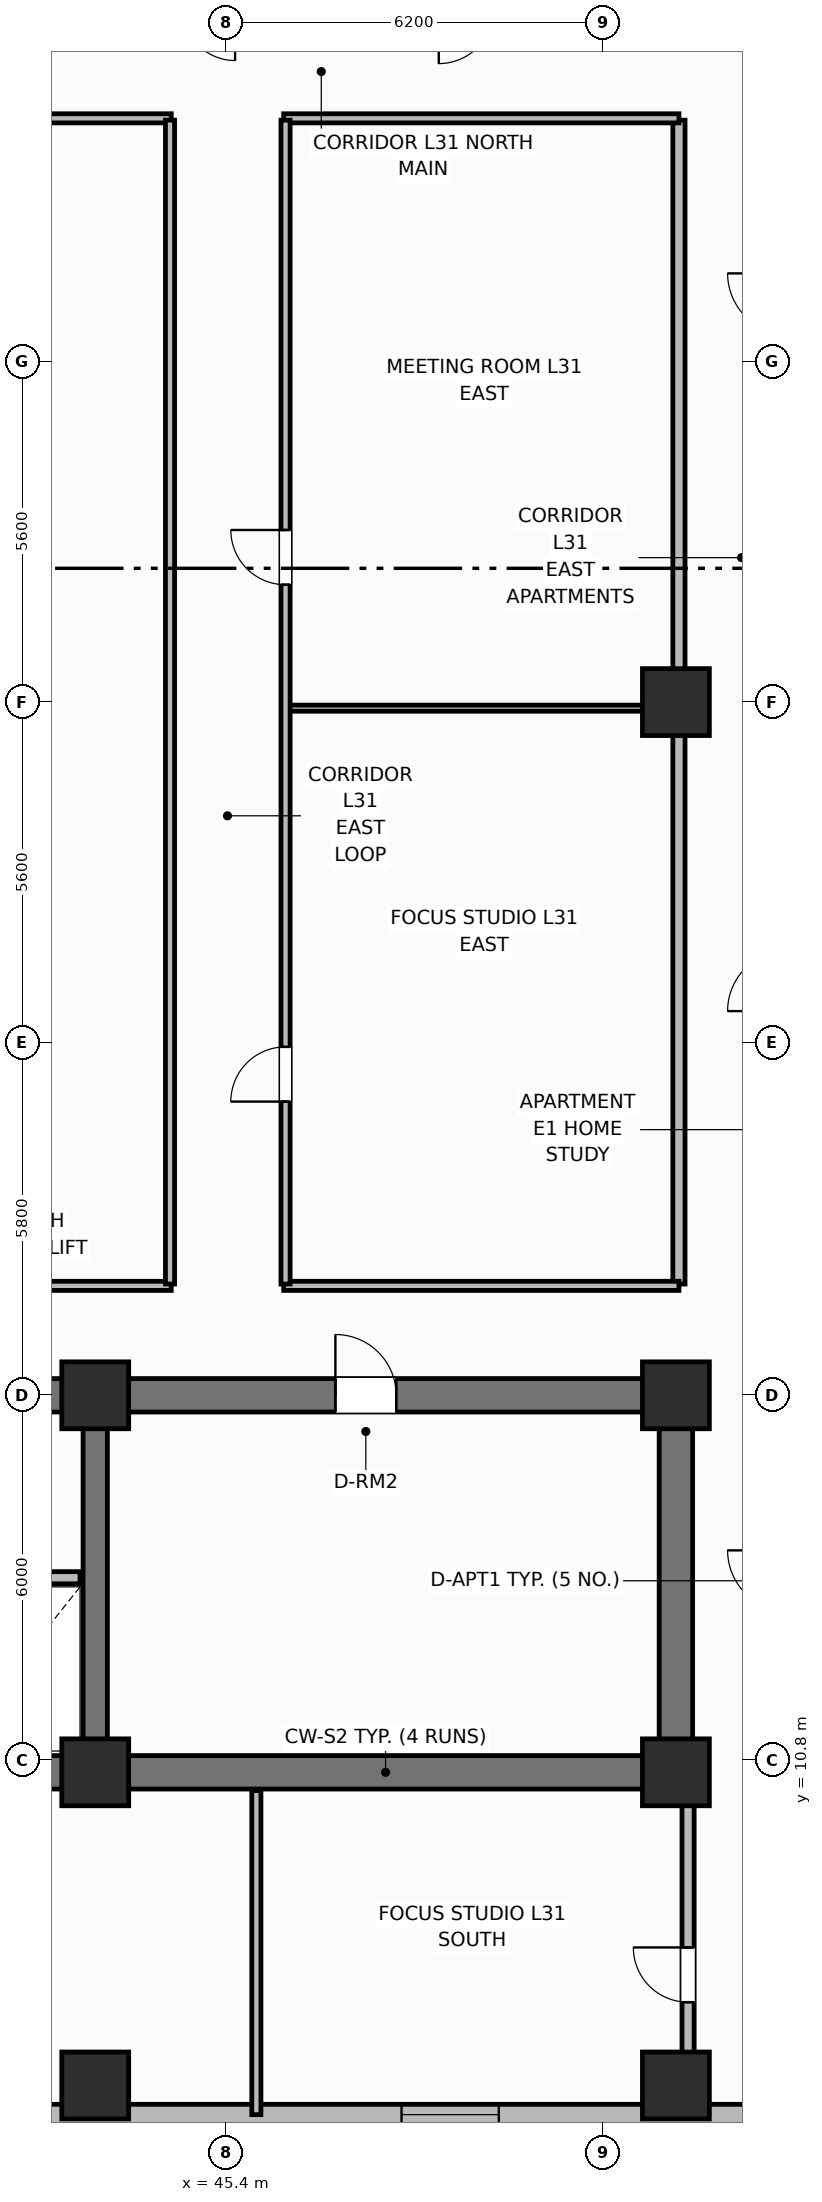
"""IFC4 building model, lengths in metres.
Left out: names, types, materials, properties, quantities, classifications, styles, units other than length and angle.
Written with IfcOpenShell. Run it as: python <this file> out.ifc"""

import sys

from ifc_helpers import new_model, si_unit, direction, frame, frame_2d, origin, origin_2d, place, context, subcontext, project, spatial, rectangle, extrude, element, fill, save


model = new_model("IFC4")
c1 = context("Model", 3, precision=1e-05, world=origin(), true_north=direction((0.0, 1.0)))
c2 = subcontext(c1, "Body", "Model", "MODEL_VIEW")
j1 = project(units=[si_unit("LENGTHUNIT", "METRE"), si_unit("PLANEANGLEUNIT", "RADIAN")], contexts=[c1])
p1 = place(None, origin())
s1 = spatial("IfcSite", under=j1, at=p1, CompositionType="ELEMENT")
p2 = place(p1, origin())
s2 = spatial("IfcBuilding", under=s1, at=p2, CompositionType="ELEMENT")
p3 = place(p2, frame((0.0, 0.0, 125.3)))
s3 = spatial("IfcBuildingStorey", under=s2, at=p3, CompositionType="ELEMENT", Elevation=125.3)
p4 = place(p3, frame((52.8, 10.6, 0.0), z_axis=(0.0, 0.0, 1.0), x_axis=(-1.0, 0.0, 0.0)))
e1 = element("IfcWall", 1, at=p4, inside=s3, PredefinedType="SHEAR", context=c2, shape_type="SweptSolid", body=[
    extrude(rectangle(XDim=27.2, YDim=0.55, at=frame_2d((13.6, 0.0))), origin(), (0.0, 0.0, 1.0), 3.7),
])
p5 = place(p3, frame((52.8, 10.875, 0.0), z_axis=(0.0, 0.0, 1.0), x_axis=(0.0, 1.0, 0.0)))
e2 = element("IfcWall", 2, at=p5, inside=s3, PredefinedType="SHEAR", context=c2, shape_type="SweptSolid", body=[
    extrude(rectangle(XDim=5.65, YDim=0.55, at=frame_2d((2.825, 0.0))), origin(), (0.0, 0.0, 1.0), 3.7),
])
p6 = place(p3, frame((25.6, 16.8, 0.0), z_axis=(0.0, 0.0, 1.0), x_axis=(1.0, 0.0, 0.0)))
e3 = element("IfcWall", 3, at=p6, inside=s3, PredefinedType="SHEAR", context=c2, shape_type="SweptSolid", body=[
    extrude(rectangle(XDim=27.2, YDim=0.55, at=frame_2d((13.6, 0.0))), origin(), (0.0, 0.0, 1.0), 3.7),
])
p7 = place(p6, frame((1.9, 0.0, 0.0)))
e4 = element("IfcOpeningElement", 4, at=p7, cuts=e3, PredefinedType="OPENING", context=c2, shape_type="SweptSolid", body=[
    extrude(rectangle(XDim=1.1, YDim=2.15, at=frame_2d((0.55, 1.075))), frame((0.0, 0.285, 0.0), z_axis=(0.0, -1.0, 0.0), x_axis=(1.0, 0.0, 0.0)), (0.0, 0.0, 1.0), 0.57),
])
p8 = place(p6, frame((13.0, 0.0, 0.0)))
e5 = element("IfcOpeningElement", 5, at=p8, cuts=e3, PredefinedType="OPENING", context=c2, shape_type="SweptSolid", body=[
    extrude(rectangle(XDim=1.2, YDim=2.15, at=frame_2d((0.6, 1.075))), frame((0.0, 0.285, 0.0), z_axis=(0.0, -1.0, 0.0), x_axis=(1.0, 0.0, 0.0)), (0.0, 0.0, 1.0), 0.57),
])
p9 = place(p6, frame((21.6, 0.0, 0.0)))
e6 = element("IfcOpeningElement", 6, at=p9, cuts=e3, PredefinedType="OPENING", context=c2, shape_type="SweptSolid", body=[
    extrude(rectangle(XDim=1.0, YDim=2.15, at=frame_2d((0.5, 1.075))), frame((0.0, 0.285, 0.0), z_axis=(0.0, -1.0, 0.0), x_axis=(1.0, 0.0, 0.0)), (0.0, 0.0, 1.0), 0.57),
])
p10 = place(p3, frame((43.25, 10.875, 0.0), z_axis=(0.0, 0.0, 1.0), x_axis=(0.0, 1.0, 0.0)))
e7 = element("IfcWall", 7, at=p10, inside=s3, PredefinedType="SHEAR", context=c2, shape_type="SweptSolid", body=[
    extrude(rectangle(XDim=5.65, YDim=0.4, at=frame_2d((2.825, 0.0))), origin(), (0.0, 0.0, 1.0), 3.7),
])
for number, where, z_axis, x_axis in (
    (8, (43.25, 10.6, 0.0), (0.0, 0.0, 1.0), (1.0, 0.0, 0.0)),
    (9, (43.25, 16.8, 0.0), (0.0, 0.0, 1.0), (1.0, 0.0, 0.0)),
    (10, (52.8, 10.6, 0.0), (0.0, 0.0, 1.0), (1.0, 0.0, 0.0)),
    (11, (52.8, 16.8, 0.0), (0.0, 0.0, 1.0), (1.0, 0.0, 0.0)),
    (12, (52.8, 28.2, 0.0), (0.0, 0.0, 1.0), (1.0, 0.0, 0.0)),
    (13, (43.25, 5.45, 0.0), (0.0, 0.0, 1.0), (1.0, 0.0, 0.0)),
    (14, (52.8, 5.45, 0.0), (0.0, 0.0, 1.0), (1.0, 0.0, 0.0)),
):
    element("IfcColumn", number, at=place(p3, frame(where, z_axis=z_axis, x_axis=x_axis)), inside=s3, PredefinedType="COLUMN", context=c2, shape_type="SweptSolid", body=[
        extrude(rectangle(XDim=1.1, YDim=1.1, at=origin_2d()), origin(), (0.0, 0.0, 1.0), 3.7),
    ])
p11 = place(p3, frame((42.4, 4.97, 0.0), z_axis=(0.0, 0.0, 1.0), x_axis=(1.0, 0.0, 0.0)))
e15 = element("IfcWall", 15, at=p11, inside=s3, PredefinedType="SOLIDWALL", context=c2, shape_type="SweptSolid", body=[
    extrude(rectangle(XDim=17.4, YDim=0.34, at=frame_2d((8.7, 0.0))), origin(), (0.0, 0.0, 1.0), 2.7),
])
p12 = place(p11, frame((5.887, 0.0, 0.68)))
e16 = element("IfcOpeningElement", 16, at=p12, cuts=e15, PredefinedType="OPENING", context=c2, shape_type="SweptSolid", body=[
    extrude(rectangle(XDim=1.6, YDim=1.9, at=frame_2d((0.8, 0.95))), frame((0.0, 0.18, 0.0), z_axis=(0.0, -1.0, 0.0), x_axis=(1.0, 0.0, 0.0)), (0.0, 0.0, 1.0), 0.36),
])
p13 = place(p11, frame((13.938, 0.0, 0.68)))
e17 = element("IfcOpeningElement", 17, at=p13, cuts=e15, PredefinedType="OPENING", context=c2, shape_type="SweptSolid", body=[
    extrude(rectangle(XDim=1.6, YDim=1.9, at=frame_2d((0.8, 0.95))), frame((0.0, 0.18, 0.0), z_axis=(0.0, -1.0, 0.0), x_axis=(1.0, 0.0, 0.0)), (0.0, 0.0, 1.0), 0.36),
])
p14 = place(p3, frame((35.4, 13.8, 0.0), z_axis=(0.0, 0.0, 1.0), x_axis=(1.0, 0.0, 0.0)))
e18 = element("IfcWall", 18, at=p14, inside=s3, PredefinedType="PARTITIONING", context=c2, shape_type="SweptSolid", body=[
    extrude(rectangle(XDim=7.6, YDim=0.2, at=frame_2d((3.8, 0.0))), origin(), (0.0, 0.0, 1.0), 2.3),
])
p15 = place(p14, frame((0.7, 0.0, 0.0)))
e19 = element("IfcOpeningElement", 19, at=p15, cuts=e18, PredefinedType="OPENING", context=c2, shape_type="SweptSolid", body=[
    extrude(rectangle(XDim=1.1, YDim=2.15, at=frame_2d((0.55, 1.075))), frame((0.0, 0.11, 0.0), z_axis=(0.0, -1.0, 0.0), x_axis=(1.0, 0.0, 0.0)), (0.0, 0.0, 1.0), 0.22),
])
p16 = place(p14, frame((3.35, 0.0, 0.0)))
e20 = element("IfcOpeningElement", 20, at=p16, cuts=e18, PredefinedType="OPENING", context=c2, shape_type="SweptSolid", body=[
    extrude(rectangle(XDim=1.2, YDim=2.15, at=frame_2d((0.6, 1.075))), frame((0.0, 0.11, 0.0), z_axis=(0.0, -1.0, 0.0), x_axis=(1.0, 0.0, 0.0)), (0.0, 0.0, 1.0), 0.22),
])
p17 = place(p3, frame((52.85, 18.63, 0.0), z_axis=(0.0, 0.0, 1.0), x_axis=(0.0, 1.0, 0.0)))
e21 = element("IfcWall", 21, at=p17, inside=s3, PredefinedType="PARTITIONING", context=c2, shape_type="SweptSolid", body=[
    extrude(rectangle(XDim=19.14, YDim=0.2, at=frame_2d((9.57, 0.0))), origin(), (0.0, 0.0, 1.0), 2.53),
])
for number, where, z_axis, x_axis in (
    (22, (33.9, 18.6, 0.0), (0.0, 0.0, 1.0), (1.0, 0.0, 0.0)),
    (23, (33.9, 37.8, 0.0), (0.0, 0.0, 1.0), (1.0, 0.0, 0.0)),
):
    element("IfcWall", number, at=place(p3, frame(where, z_axis=z_axis, x_axis=x_axis)), inside=s3, PredefinedType="PARTITIONING", context=c2, shape_type="SweptSolid", body=[
        extrude(rectangle(XDim=10.6, YDim=0.15, at=frame_2d((5.3, 0.0))), origin(), (0.0, 0.0, 1.0), 2.53),
    ])
for number, where, z_axis, x_axis in (
    (24, (46.35, 18.6, 0.0), (0.0, 0.0, 1.0), (1.0, 0.0, 0.0)),
    (25, (46.35, 37.8, 0.0), (0.0, 0.0, 1.0), (1.0, 0.0, 0.0)),
):
    element("IfcWall", number, at=place(p3, frame(where, z_axis=z_axis, x_axis=x_axis)), inside=s3, PredefinedType="PARTITIONING", context=c2, shape_type="SweptSolid", body=[
        extrude(rectangle(XDim=6.5, YDim=0.15, at=frame_2d((3.25, 0.0))), origin(), (0.0, 0.0, 1.0), 2.53),
    ])
p18 = place(p3, frame((46.38, 28.1, 0.0), z_axis=(0.0, 0.0, 1.0), x_axis=(1.0, 0.0, 0.0)))
e26 = element("IfcWall", 26, at=p18, inside=s3, PredefinedType="PARTITIONING", context=c2, shape_type="SweptSolid", body=[
    extrude(rectangle(XDim=6.42, YDim=0.1, at=frame_2d((3.21, 0.0))), origin(), (0.0, 0.0, 1.0), 2.53),
])
p19 = place(p3, frame((44.48, 18.63, 0.0), z_axis=(0.0, 0.0, 1.0), x_axis=(0.0, 1.0, 0.0)))
e27 = element("IfcWall", 27, at=p19, inside=s3, PredefinedType="PARTITIONING", context=c2, shape_type="SweptSolid", body=[
    extrude(rectangle(XDim=19.14, YDim=0.15, at=frame_2d((9.57, 0.0))), origin(), (0.0, 0.0, 1.0), 2.53),
])
p20 = place(p3, frame((46.38, 18.63, 0.0), z_axis=(0.0, 0.0, 1.0), x_axis=(0.0, 1.0, 0.0)))
e28 = element("IfcWall", 28, at=p20, inside=s3, PredefinedType="PARTITIONING", context=c2, shape_type="SweptSolid", body=[
    extrude(rectangle(XDim=19.14, YDim=0.15, at=frame_2d((9.57, 0.0))), origin(), (0.0, 0.0, 1.0), 2.53),
])
p21 = place(p20, frame((3.0, 0.0, 0.0)))
e29 = element("IfcOpeningElement", 29, at=p21, cuts=e28, PredefinedType="OPENING", context=c2, shape_type="SweptSolid", body=[
    extrude(rectangle(XDim=0.9, YDim=2.1, at=frame_2d((0.45, 1.05))), frame((0.0, 0.085, 0.0), z_axis=(0.0, -1.0, 0.0), x_axis=(1.0, 0.0, 0.0)), (0.0, 0.0, 1.0), 0.17),
])
p22 = place(p20, frame((11.5, 0.0, 0.0)))
e30 = element("IfcOpeningElement", 30, at=p22, cuts=e28, PredefinedType="OPENING", context=c2, shape_type="SweptSolid", body=[
    extrude(rectangle(XDim=0.9, YDim=2.1, at=frame_2d((0.45, 1.05))), frame((0.0, 0.085, 0.0), z_axis=(0.0, -1.0, 0.0), x_axis=(1.0, 0.0, 0.0)), (0.0, 0.0, 1.0), 0.17),
])
p23 = place(p3, frame((45.9, 4.97, 0.0), z_axis=(0.0, 0.0, 1.0), x_axis=(0.0, 1.0, 0.0)))
e31 = element("IfcWall", 31, at=p23, inside=s3, PredefinedType="PARTITIONING", context=c2, shape_type="SweptSolid", body=[
    extrude(rectangle(XDim=5.33, YDim=0.15, at=frame_2d((2.665, 0.0))), origin(), (0.0, 0.0, 1.0), 2.53),
])
p24 = place(p3, frame((53.0, 5.77, 0.0), z_axis=(0.0, 0.0, 1.0), x_axis=(0.0, 1.0, 0.0)))
e32 = element("IfcWall", 32, at=p24, inside=s3, PredefinedType="PARTITIONING", context=c2, shape_type="SweptSolid", body=[
    extrude(rectangle(XDim=4.53, YDim=0.2, at=frame_2d((2.265, 0.0))), origin(), (0.0, 0.0, 1.0), 2.53),
])
p25 = place(p24, frame((1.05, 0.0, 0.0)))
e33 = element("IfcOpeningElement", 33, at=p25, cuts=e32, PredefinedType="OPENING", context=c2, shape_type="SweptSolid", body=[
    extrude(rectangle(XDim=0.9, YDim=2.1, at=frame_2d((0.45, 1.05))), frame((0.0, 0.11, 0.0), z_axis=(0.0, -1.0, 0.0), x_axis=(1.0, 0.0, 0.0)), (0.0, 0.0, 1.0), 0.22),
])
p26 = place(p12, origin())
e34 = element("IfcWindow", 34, at=p26, inside=s3, PartitioningType="SINGLE_PANEL", PredefinedType="WINDOW", context=c2, shape_type="SweptSolid", body=[
    extrude(rectangle(XDim=1.6, YDim=1.9, at=frame_2d((0.8, 0.95))), frame((0.0, 0.03, 0.0), z_axis=(0.0, -1.0, 0.0), x_axis=(1.0, 0.0, 0.0)), (0.0, 0.0, 1.0), 0.06),
])
fill(e16, e34)
p27 = place(p21, origin())
e35 = element("IfcDoor", 35, at=p27, inside=s3, OperationType="SINGLE_SWING_LEFT", PredefinedType="DOOR", context=c2, shape_type="SweptSolid", body=[
    extrude(rectangle(XDim=0.9, YDim=2.1, at=frame_2d((0.45, 1.05))), frame((0.0, 0.025, 0.0), z_axis=(0.0, -1.0, 0.0), x_axis=(1.0, 0.0, 0.0)), (0.0, 0.0, 1.0), 0.05),
])
fill(e29, e35)
p28 = place(p22, origin())
e36 = element("IfcDoor", 36, at=p28, inside=s3, OperationType="SINGLE_SWING_RIGHT", PredefinedType="DOOR", context=c2, shape_type="SweptSolid", body=[
    extrude(rectangle(XDim=0.9, YDim=2.1, at=frame_2d((0.45, 1.05))), frame((0.0, 0.025, 0.0), z_axis=(0.0, -1.0, 0.0), x_axis=(1.0, 0.0, 0.0)), (0.0, 0.0, 1.0), 0.05),
])
fill(e30, e36)
p29 = place(p25, origin())
e37 = element("IfcDoor", 37, at=p29, inside=s3, OperationType="SINGLE_SWING_RIGHT", PredefinedType="DOOR", context=c2, shape_type="SweptSolid", body=[
    extrude(rectangle(XDim=0.9, YDim=2.1, at=frame_2d((0.45, 1.05))), frame((0.0, 0.025, 0.0), z_axis=(0.0, -1.0, 0.0), x_axis=(1.0, 0.0, 0.0)), (0.0, 0.0, 1.0), 0.05),
])
fill(e33, e37)
p30 = place(p9, origin())
e38 = element("IfcDoor", 38, at=p30, inside=s3, OperationType="SINGLE_SWING_LEFT", PredefinedType="DOOR", context=c2, shape_type="SweptSolid", body=[
    extrude(rectangle(XDim=1.0, YDim=2.15, at=frame_2d((0.5, 1.075))), frame((0.0, 0.025, 0.0), z_axis=(0.0, -1.0, 0.0), x_axis=(1.0, 0.0, 0.0)), (0.0, 0.0, 1.0), 0.05),
])
fill(e6, e38)
save(model, sys.argv[1])
